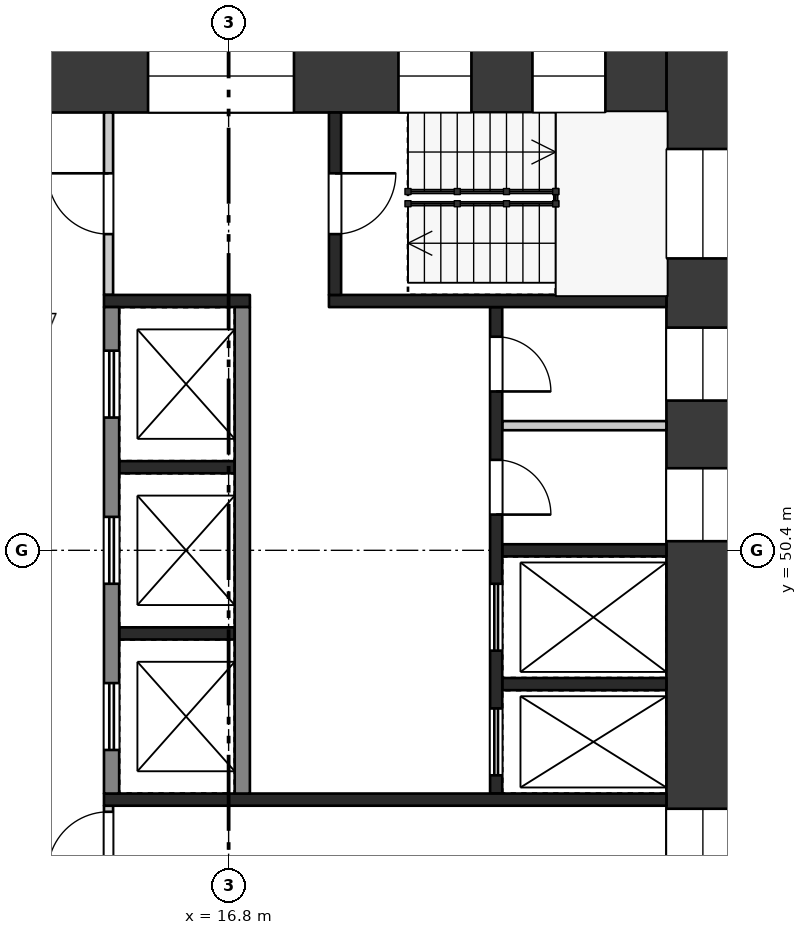
"""IFC4 building model, lengths in metres.
Left out: names, types, materials, properties, quantities, classifications, styles, units other than length and angle.
Written with IfcOpenShell. Run it as: python <this file> out.ifc"""

import sys

from ifc_helpers import new_model, si_unit, direction, frame, frame_2d, origin, place, context, subcontext, project, spatial, rectangle, extrude, element, fill, save


model = new_model("IFC4")
c1 = context("Model", 3, precision=1e-05, world=origin(), true_north=direction((0.0, 1.0)))
c2 = subcontext(c1, "Body", "Model", "MODEL_VIEW")
j1 = project(units=[si_unit("LENGTHUNIT", "METRE"), si_unit("PLANEANGLEUNIT", "RADIAN")], contexts=[c1])
p1 = place(None, origin())
s1 = spatial("IfcSite", under=j1, at=p1, CompositionType="ELEMENT")
p2 = place(p1, origin())
s2 = spatial("IfcBuilding", under=s1, at=p2, CompositionType="ELEMENT")
p3 = place(p2, frame((0.0, 0.0, 224.7)))
s3 = spatial("IfcBuildingStorey", under=s2, at=p3, CompositionType="ELEMENT", Elevation=224.7)
p4 = place(p3, frame((24.6, 58.8, 0.0), z_axis=(0.0, 0.0, 1.0), x_axis=(0.0, -1.0, 0.0)))
e1 = element("IfcWall", 1, at=p4, inside=s3, PredefinedType="SHEAR", context=c2, shape_type="SweptSolid", body=[
    extrude(rectangle(XDim=16.8, YDim=1.2, at=frame_2d((8.4, 0.0))), origin(), (0.0, 0.0, 1.0), 3.22),
])
p5 = place(p4, frame((1.8, 0.0, 0.5)))
e2 = element("IfcOpeningElement", 2, at=p5, cuts=e1, PredefinedType="OPENING", context=c2, shape_type="SweptSolid", body=[
    extrude(rectangle(XDim=1.8, YDim=2.4, at=frame_2d((0.9, 1.2))), frame((0.0, 0.61, 0.0), z_axis=(0.0, -1.0, 0.0), x_axis=(1.0, 0.0, 0.0)), (0.0, 0.0, 1.0), 1.22),
])
p6 = place(p4, frame((4.738, 0.0, 1.6)))
e3 = element("IfcOpeningElement", 3, at=p6, cuts=e1, PredefinedType="OPENING", context=c2, shape_type="SweptSolid", body=[
    extrude(rectangle(XDim=1.2, YDim=1.2, at=frame_2d((0.6, 0.6))), frame((0.0, 0.61, 0.0), z_axis=(0.0, -1.0, 0.0), x_axis=(1.0, 0.0, 0.0)), (0.0, 0.0, 1.0), 1.22),
])
p7 = place(p4, frame((7.05, 0.0, 1.6)))
e4 = element("IfcOpeningElement", 4, at=p7, cuts=e1, PredefinedType="OPENING", context=c2, shape_type="SweptSolid", body=[
    extrude(rectangle(XDim=1.2, YDim=1.2, at=frame_2d((0.6, 0.6))), frame((0.0, 0.61, 0.0), z_axis=(0.0, -1.0, 0.0), x_axis=(1.0, 0.0, 0.0)), (0.0, 0.0, 1.0), 1.22),
])
p8 = place(p4, frame((12.65, 0.0, 0.6)))
e5 = element("IfcOpeningElement", 5, at=p8, cuts=e1, PredefinedType="OPENING", context=c2, shape_type="SweptSolid", body=[
    extrude(rectangle(XDim=1.0, YDim=2.1, at=frame_2d((0.5, 1.05))), frame((0.0, 0.61, 0.0), z_axis=(0.0, -1.0, 0.0), x_axis=(1.0, 0.0, 0.0)), (0.0, 0.0, 1.0), 1.22),
])
p9 = place(p4, frame((14.175, 0.0, 1.6)))
e6 = element("IfcOpeningElement", 6, at=p9, cuts=e1, PredefinedType="OPENING", context=c2, shape_type="SweptSolid", body=[
    extrude(rectangle(XDim=1.2, YDim=1.2, at=frame_2d((0.6, 0.6))), frame((0.0, 0.61, 0.0), z_axis=(0.0, -1.0, 0.0), x_axis=(1.0, 0.0, 0.0)), (0.0, 0.0, 1.0), 1.22),
])
p10 = place(p3, frame((9.6, 58.2, 0.0), z_axis=(0.0, 0.0, 1.0), x_axis=(1.0, 0.0, 0.0)))
e7 = element("IfcWall", 7, at=p10, inside=s3, PredefinedType="SHEAR", context=c2, shape_type="SweptSolid", body=[
    extrude(rectangle(XDim=14.4, YDim=1.2, at=frame_2d((7.2, 0.0))), origin(), (0.0, 0.0, 1.0), 3.22),
])
p11 = place(p10, frame((1.105, 0.0, 0.6)))
e8 = element("IfcOpeningElement", 8, at=p11, cuts=e7, PredefinedType="OPENING", context=c2, shape_type="SweptSolid", body=[
    extrude(rectangle(XDim=3.0, YDim=2.1, at=frame_2d((1.5, 1.05))), frame((0.0, 0.61, 0.0), z_axis=(0.0, -1.0, 0.0), x_axis=(1.0, 0.0, 0.0)), (0.0, 0.0, 1.0), 1.22),
])
p12 = place(p10, frame((5.875, 0.0, 0.6)))
e9 = element("IfcOpeningElement", 9, at=p12, cuts=e7, PredefinedType="OPENING", context=c2, shape_type="SweptSolid", body=[
    extrude(rectangle(XDim=2.4, YDim=2.1, at=frame_2d((1.2, 1.05))), frame((0.0, 0.61, 0.0), z_axis=(0.0, -1.0, 0.0), x_axis=(1.0, 0.0, 0.0)), (0.0, 0.0, 1.0), 1.22),
])
p13 = place(p10, frame((9.993, 0.0, 0.5)))
e10 = element("IfcOpeningElement", 10, at=p13, cuts=e7, PredefinedType="OPENING", context=c2, shape_type="SweptSolid", body=[
    extrude(rectangle(XDim=1.2, YDim=2.4, at=frame_2d((0.6, 1.2))), frame((0.0, 0.61, 0.0), z_axis=(0.0, -1.0, 0.0), x_axis=(1.0, 0.0, 0.0)), (0.0, 0.0, 1.0), 1.22),
])
p14 = place(p10, frame((12.197, 0.0, 0.5)))
e11 = element("IfcOpeningElement", 11, at=p14, cuts=e7, PredefinedType="OPENING", context=c2, shape_type="SweptSolid", body=[
    extrude(rectangle(XDim=1.2, YDim=2.4, at=frame_2d((0.6, 1.2))), frame((0.0, 0.61, 0.0), z_axis=(0.0, -1.0, 0.0), x_axis=(1.0, 0.0, 0.0)), (0.0, 0.0, 1.0), 1.22),
])
for number, where, z_axis, x_axis in (
    (12, (15.0, 51.767, 0.0), (0.0, 0.0, 1.0), (1.0, 0.0, 0.0)),
    (13, (15.0, 49.033, 0.0), (0.0, 0.0, 1.0), (1.0, 0.0, 0.0)),
):
    element("IfcWall", number, at=place(p3, frame(where, z_axis=z_axis, x_axis=x_axis)), inside=s3, PredefinedType="SHEAR", context=c2, shape_type="SweptSolid", body=[
        extrude(rectangle(XDim=1.9, YDim=0.2, at=frame_2d((0.95, 0.0))), origin(), (0.0, 0.0, 1.0), 3.22),
    ])
p15 = place(p3, frame((14.875, 54.4, 0.0), z_axis=(0.0, 0.0, 1.0), x_axis=(0.0, -1.0, 0.0)))
e14 = element("IfcWall", 14, at=p15, inside=s3, PredefinedType="SHEAR", context=c2, shape_type="SweptSolid", body=[
    extrude(rectangle(XDim=8.0, YDim=0.25, at=frame_2d((4.0, 0.0))), origin(), (0.0, 0.0, 1.0), 3.22),
])
p16 = place(p15, frame((0.717, 0.0, 0.0)))
e15 = element("IfcOpeningElement", 15, at=p16, cuts=e14, PredefinedType="OPENING", context=c2, shape_type="SweptSolid", body=[
    extrude(rectangle(XDim=1.1, YDim=2.1, at=frame_2d((0.55, 1.05))), frame((0.0, 0.135, 0.0), z_axis=(0.0, -1.0, 0.0), x_axis=(1.0, 0.0, 0.0)), (0.0, 0.0, 1.0), 0.27),
])
p17 = place(p15, frame((3.45, 0.0, 0.0)))
e16 = element("IfcOpeningElement", 16, at=p17, cuts=e14, PredefinedType="OPENING", context=c2, shape_type="SweptSolid", body=[
    extrude(rectangle(XDim=1.1, YDim=2.1, at=frame_2d((0.55, 1.05))), frame((0.0, 0.135, 0.0), z_axis=(0.0, -1.0, 0.0), x_axis=(1.0, 0.0, 0.0)), (0.0, 0.0, 1.0), 0.27),
])
p18 = place(p15, frame((6.183, 0.0, 0.0)))
e17 = element("IfcOpeningElement", 17, at=p18, cuts=e14, PredefinedType="OPENING", context=c2, shape_type="SweptSolid", body=[
    extrude(rectangle(XDim=1.1, YDim=2.1, at=frame_2d((0.55, 1.05))), frame((0.0, 0.135, 0.0), z_axis=(0.0, -1.0, 0.0), x_axis=(1.0, 0.0, 0.0)), (0.0, 0.0, 1.0), 0.27),
])
p19 = place(p3, frame((17.025, 54.4, 0.0), z_axis=(0.0, 0.0, 1.0), x_axis=(0.0, -1.0, 0.0)))
e18 = element("IfcWall", 18, at=p19, inside=s3, PredefinedType="SHEAR", context=c2, shape_type="SweptSolid", body=[
    extrude(rectangle(XDim=8.0, YDim=0.25, at=frame_2d((4.0, 0.0))), origin(), (0.0, 0.0, 1.0), 3.22),
])
for number, where, z_axis, x_axis in (
    (19, (21.3, 50.4, 0.0), (0.0, 0.0, 1.0), (1.0, 0.0, 0.0)),
    (20, (21.3, 48.2, 0.0), (0.0, 0.0, 1.0), (1.0, 0.0, 0.0)),
):
    element("IfcWall", number, at=place(p3, frame(where, z_axis=z_axis, x_axis=x_axis)), inside=s3, PredefinedType="SHEAR", context=c2, shape_type="SweptSolid", body=[
        extrude(rectangle(XDim=2.7, YDim=0.2, at=frame_2d((1.35, 0.0))), origin(), (0.0, 0.0, 1.0), 3.22),
    ])
p20 = place(p3, frame((21.3, 52.45, 0.0), z_axis=(0.0, 0.0, 1.0), x_axis=(1.0, 0.0, 0.0)))
e21 = element("IfcWall", 21, at=p20, inside=s3, PredefinedType="PARTITIONING", context=c2, shape_type="SweptSolid", body=[
    extrude(rectangle(XDim=2.7, YDim=0.15, at=frame_2d((1.35, 0.0))), origin(), (0.0, 0.0, 1.0), 3.22),
])
p21 = place(p3, frame((21.2, 54.4, 0.0), z_axis=(0.0, 0.0, 1.0), x_axis=(0.0, -1.0, 0.0)))
e22 = element("IfcWall", 22, at=p21, inside=s3, PredefinedType="SHEAR", context=c2, shape_type="SweptSolid", body=[
    extrude(rectangle(XDim=8.0, YDim=0.2, at=frame_2d((4.0, 0.0))), origin(), (0.0, 0.0, 1.0), 3.22),
])
p22 = place(p21, frame((0.488, 0.0, 0.0)))
e23 = element("IfcOpeningElement", 23, at=p22, cuts=e22, PredefinedType="OPENING", context=c2, shape_type="SweptSolid", body=[
    extrude(rectangle(XDim=0.9, YDim=2.1, at=frame_2d((0.45, 1.05))), frame((0.0, 0.11, 0.0), z_axis=(0.0, -1.0, 0.0), x_axis=(1.0, 0.0, 0.0)), (0.0, 0.0, 1.0), 0.22),
])
p23 = place(p21, frame((2.512, 0.0, 0.0)))
e24 = element("IfcOpeningElement", 24, at=p23, cuts=e22, PredefinedType="OPENING", context=c2, shape_type="SweptSolid", body=[
    extrude(rectangle(XDim=0.9, YDim=2.1, at=frame_2d((0.45, 1.05))), frame((0.0, 0.11, 0.0), z_axis=(0.0, -1.0, 0.0), x_axis=(1.0, 0.0, 0.0)), (0.0, 0.0, 1.0), 0.22),
])
p24 = place(p21, frame((4.55, 0.0, 0.0)))
e25 = element("IfcOpeningElement", 25, at=p24, cuts=e22, PredefinedType="OPENING", context=c2, shape_type="SweptSolid", body=[
    extrude(rectangle(XDim=1.1, YDim=2.1, at=frame_2d((0.55, 1.05))), frame((0.0, 0.11, 0.0), z_axis=(0.0, -1.0, 0.0), x_axis=(1.0, 0.0, 0.0)), (0.0, 0.0, 1.0), 0.22),
])
p25 = place(p21, frame((6.6, 0.0, 0.0)))
e26 = element("IfcOpeningElement", 26, at=p25, cuts=e22, PredefinedType="OPENING", context=c2, shape_type="SweptSolid", body=[
    extrude(rectangle(XDim=1.1, YDim=2.1, at=frame_2d((0.55, 1.05))), frame((0.0, 0.11, 0.0), z_axis=(0.0, -1.0, 0.0), x_axis=(1.0, 0.0, 0.0)), (0.0, 0.0, 1.0), 0.22),
])
p26 = place(p3, frame((14.75, 54.5, 0.0), z_axis=(0.0, 0.0, 1.0), x_axis=(1.0, 0.0, 0.0)))
e27 = element("IfcWall", 27, at=p26, inside=s3, PredefinedType="SHEAR", context=c2, shape_type="SweptSolid", body=[
    extrude(rectangle(XDim=2.4, YDim=0.2, at=frame_2d((1.2, 0.0))), origin(), (0.0, 0.0, 1.0), 3.22),
])
p27 = place(p3, frame((18.45, 54.5, 0.0), z_axis=(0.0, 0.0, 1.0), x_axis=(1.0, 0.0, 0.0)))
e28 = element("IfcWall", 28, at=p27, inside=s3, PredefinedType="SHEAR", context=c2, shape_type="SweptSolid", body=[
    extrude(rectangle(XDim=5.55, YDim=0.2, at=frame_2d((2.775, 0.0))), origin(), (0.0, 0.0, 1.0), 3.22),
])
p28 = place(p3, frame((14.825, 57.6, 0.0), z_axis=(0.0, 0.0, 1.0), x_axis=(0.0, -1.0, 0.0)))
e29 = element("IfcWall", 29, at=p28, inside=s3, PredefinedType="PARTITIONING", context=c2, shape_type="SweptSolid", body=[
    extrude(rectangle(XDim=3.0, YDim=0.15, at=frame_2d((1.5, 0.0))), origin(), (0.0, 0.0, 1.0), 3.22),
])
p29 = place(p28, frame((1.0, 0.0, 0.0)))
e30 = element("IfcOpeningElement", 30, at=p29, cuts=e29, PredefinedType="OPENING", context=c2, shape_type="SweptSolid", body=[
    extrude(rectangle(XDim=1.0, YDim=2.1, at=frame_2d((0.5, 1.05))), frame((0.0, 0.085, 0.0), z_axis=(0.0, -1.0, 0.0), x_axis=(1.0, 0.0, 0.0)), (0.0, 0.0, 1.0), 0.17),
])
p30 = place(p3, frame((18.55, 57.6, 0.0), z_axis=(0.0, 0.0, 1.0), x_axis=(0.0, -1.0, 0.0)))
e31 = element("IfcWall", 31, at=p30, inside=s3, PredefinedType="SHEAR", context=c2, shape_type="SweptSolid", body=[
    extrude(rectangle(XDim=3.0, YDim=0.2, at=frame_2d((1.5, 0.0))), origin(), (0.0, 0.0, 1.0), 3.22),
])
p31 = place(p30, frame((1.0, 0.0, 0.0)))
e32 = element("IfcOpeningElement", 32, at=p31, cuts=e31, PredefinedType="OPENING", context=c2, shape_type="SweptSolid", body=[
    extrude(rectangle(XDim=1.0, YDim=2.1, at=frame_2d((0.5, 1.05))), frame((0.0, 0.11, 0.0), z_axis=(0.0, -1.0, 0.0), x_axis=(1.0, 0.0, 0.0)), (0.0, 0.0, 1.0), 0.22),
])
p32 = place(p3, frame((14.75, 46.3, 0.0), z_axis=(0.0, 0.0, 1.0), x_axis=(1.0, 0.0, 0.0)))
e33 = element("IfcWall", 33, at=p32, inside=s3, PredefinedType="SHEAR", context=c2, shape_type="SweptSolid", body=[
    extrude(rectangle(XDim=9.25, YDim=0.2, at=frame_2d((4.625, 0.0))), origin(), (0.0, 0.0, 1.0), 3.22),
])
p33 = place(p3, frame((14.825, 46.2, 0.0), z_axis=(0.0, 0.0, 1.0), x_axis=(0.0, -1.0, 0.0)))
e34 = element("IfcWall", 34, at=p33, inside=s3, PredefinedType="PARTITIONING", context=c2, shape_type="SweptSolid", body=[
    extrude(rectangle(XDim=3.0, YDim=0.15, at=frame_2d((1.5, 0.0))), origin(), (0.0, 0.0, 1.0), 3.22),
])
p34 = place(p33, frame((0.1, 0.0, 0.0)))
e35 = element("IfcOpeningElement", 35, at=p34, cuts=e34, PredefinedType="OPENING", context=c2, shape_type="SweptSolid", body=[
    extrude(rectangle(XDim=1.0, YDim=2.1, at=frame_2d((0.5, 1.05))), frame((0.0, 0.085, 0.0), z_axis=(0.0, -1.0, 0.0), x_axis=(1.0, 0.0, 0.0)), (0.0, 0.0, 1.0), 0.17),
])
p35 = place(p16, origin())
e36 = element("IfcDoor", 36, at=p35, inside=s3, OperationType="DOUBLE_DOOR_SLIDING", PredefinedType="DOOR", context=c2, shape_type="SweptSolid", body=[
    extrude(rectangle(XDim=1.1, YDim=2.1, at=frame_2d((0.55, 1.05))), frame((0.0, 0.025, 0.0), z_axis=(0.0, -1.0, 0.0), x_axis=(1.0, 0.0, 0.0)), (0.0, 0.0, 1.0), 0.05),
])
fill(e15, e36)
p36 = place(p17, origin())
e37 = element("IfcDoor", 37, at=p36, inside=s3, OperationType="DOUBLE_DOOR_SLIDING", PredefinedType="DOOR", context=c2, shape_type="SweptSolid", body=[
    extrude(rectangle(XDim=1.1, YDim=2.1, at=frame_2d((0.55, 1.05))), frame((0.0, 0.025, 0.0), z_axis=(0.0, -1.0, 0.0), x_axis=(1.0, 0.0, 0.0)), (0.0, 0.0, 1.0), 0.05),
])
fill(e16, e37)
p37 = place(p18, origin())
e38 = element("IfcDoor", 38, at=p37, inside=s3, OperationType="DOUBLE_DOOR_SLIDING", PredefinedType="DOOR", context=c2, shape_type="SweptSolid", body=[
    extrude(rectangle(XDim=1.1, YDim=2.1, at=frame_2d((0.55, 1.05))), frame((0.0, 0.025, 0.0), z_axis=(0.0, -1.0, 0.0), x_axis=(1.0, 0.0, 0.0)), (0.0, 0.0, 1.0), 0.05),
])
fill(e17, e38)
p38 = place(p22, origin())
e39 = element("IfcDoor", 39, at=p38, inside=s3, OperationType="SINGLE_SWING_RIGHT", PredefinedType="DOOR", context=c2, shape_type="SweptSolid", body=[
    extrude(rectangle(XDim=0.9, YDim=2.1, at=frame_2d((0.45, 1.05))), frame((0.0, 0.025, 0.0), z_axis=(0.0, -1.0, 0.0), x_axis=(1.0, 0.0, 0.0)), (0.0, 0.0, 1.0), 0.05),
])
fill(e23, e39)
p39 = place(p23, origin())
e40 = element("IfcDoor", 40, at=p39, inside=s3, OperationType="SINGLE_SWING_RIGHT", PredefinedType="DOOR", context=c2, shape_type="SweptSolid", body=[
    extrude(rectangle(XDim=0.9, YDim=2.1, at=frame_2d((0.45, 1.05))), frame((0.0, 0.025, 0.0), z_axis=(0.0, -1.0, 0.0), x_axis=(1.0, 0.0, 0.0)), (0.0, 0.0, 1.0), 0.05),
])
fill(e24, e40)
p40 = place(p24, origin())
e41 = element("IfcDoor", 41, at=p40, inside=s3, OperationType="DOUBLE_DOOR_SLIDING", PredefinedType="DOOR", context=c2, shape_type="SweptSolid", body=[
    extrude(rectangle(XDim=1.1, YDim=2.1, at=frame_2d((0.55, 1.05))), frame((0.0, 0.025, 0.0), z_axis=(0.0, -1.0, 0.0), x_axis=(1.0, 0.0, 0.0)), (0.0, 0.0, 1.0), 0.05),
])
fill(e25, e41)
p41 = place(p25, origin())
e42 = element("IfcDoor", 42, at=p41, inside=s3, OperationType="DOUBLE_DOOR_SLIDING", PredefinedType="DOOR", context=c2, shape_type="SweptSolid", body=[
    extrude(rectangle(XDim=1.1, YDim=2.1, at=frame_2d((0.55, 1.05))), frame((0.0, 0.025, 0.0), z_axis=(0.0, -1.0, 0.0), x_axis=(1.0, 0.0, 0.0)), (0.0, 0.0, 1.0), 0.05),
])
fill(e26, e42)
p42 = place(p29, frame((1.0, 0.0, 0.0), z_axis=(0.0, 0.0, 1.0), x_axis=(-1.0, 0.0, 0.0)))
e43 = element("IfcDoor", 43, at=p42, inside=s3, OperationType="SINGLE_SWING_RIGHT", PredefinedType="DOOR", context=c2, shape_type="SweptSolid", body=[
    extrude(rectangle(XDim=1.0, YDim=2.1, at=frame_2d((0.5, 1.05))), frame((0.0, 0.025, 0.0), z_axis=(0.0, -1.0, 0.0), x_axis=(1.0, 0.0, 0.0)), (0.0, 0.0, 1.0), 0.05),
])
fill(e30, e43)
p43 = place(p31, origin())
e44 = element("IfcDoor", 44, at=p43, inside=s3, OperationType="SINGLE_SWING_LEFT", PredefinedType="DOOR", context=c2, shape_type="SweptSolid", body=[
    extrude(rectangle(XDim=1.0, YDim=2.1, at=frame_2d((0.5, 1.05))), frame((0.0, 0.025, 0.0), z_axis=(0.0, -1.0, 0.0), x_axis=(1.0, 0.0, 0.0)), (0.0, 0.0, 1.0), 0.05),
])
fill(e32, e44)
p44 = place(p34, frame((1.0, 0.0, 0.0), z_axis=(0.0, 0.0, 1.0), x_axis=(-1.0, 0.0, 0.0)))
e45 = element("IfcDoor", 45, at=p44, inside=s3, OperationType="SINGLE_SWING_LEFT", PredefinedType="DOOR", context=c2, shape_type="SweptSolid", body=[
    extrude(rectangle(XDim=1.0, YDim=2.1, at=frame_2d((0.5, 1.05))), frame((0.0, 0.025, 0.0), z_axis=(0.0, -1.0, 0.0), x_axis=(1.0, 0.0, 0.0)), (0.0, 0.0, 1.0), 0.05),
])
fill(e35, e45)
p45 = place(p5, origin())
e46 = element("IfcWindow", 46, at=p45, inside=s3, PartitioningType="SINGLE_PANEL", PredefinedType="WINDOW", context=c2, shape_type="SweptSolid", body=[
    extrude(rectangle(XDim=1.8, YDim=2.4, at=frame_2d((0.9, 1.2))), frame((0.0, 0.03, 0.0), z_axis=(0.0, -1.0, 0.0), x_axis=(1.0, 0.0, 0.0)), (0.0, 0.0, 1.0), 0.06),
])
fill(e2, e46)
p46 = place(p6, origin())
e47 = element("IfcWindow", 47, at=p46, inside=s3, PartitioningType="SINGLE_PANEL", PredefinedType="WINDOW", context=c2, shape_type="SweptSolid", body=[
    extrude(rectangle(XDim=1.2, YDim=1.2, at=frame_2d((0.6, 0.6))), frame((0.0, 0.03, 0.0), z_axis=(0.0, -1.0, 0.0), x_axis=(1.0, 0.0, 0.0)), (0.0, 0.0, 1.0), 0.06),
])
fill(e3, e47)
p47 = place(p7, origin())
e48 = element("IfcWindow", 48, at=p47, inside=s3, PartitioningType="SINGLE_PANEL", PredefinedType="WINDOW", context=c2, shape_type="SweptSolid", body=[
    extrude(rectangle(XDim=1.2, YDim=1.2, at=frame_2d((0.6, 0.6))), frame((0.0, 0.03, 0.0), z_axis=(0.0, -1.0, 0.0), x_axis=(1.0, 0.0, 0.0)), (0.0, 0.0, 1.0), 0.06),
])
fill(e4, e48)
p48 = place(p8, origin())
e49 = element("IfcWindow", 49, at=p48, inside=s3, PartitioningType="SINGLE_PANEL", PredefinedType="WINDOW", context=c2, shape_type="SweptSolid", body=[
    extrude(rectangle(XDim=1.0, YDim=2.1, at=frame_2d((0.5, 1.05))), frame((0.0, 0.03, 0.0), z_axis=(0.0, -1.0, 0.0), x_axis=(1.0, 0.0, 0.0)), (0.0, 0.0, 1.0), 0.06),
])
fill(e5, e49)
p49 = place(p12, origin())
e50 = element("IfcWindow", 50, at=p49, inside=s3, PartitioningType="SINGLE_PANEL", PredefinedType="WINDOW", context=c2, shape_type="SweptSolid", body=[
    extrude(rectangle(XDim=2.4, YDim=2.1, at=frame_2d((1.2, 1.05))), frame((0.0, 0.03, 0.0), z_axis=(0.0, -1.0, 0.0), x_axis=(1.0, 0.0, 0.0)), (0.0, 0.0, 1.0), 0.06),
])
fill(e9, e50)
p50 = place(p13, origin())
e51 = element("IfcWindow", 51, at=p50, inside=s3, PartitioningType="SINGLE_PANEL", PredefinedType="WINDOW", context=c2, shape_type="SweptSolid", body=[
    extrude(rectangle(XDim=1.2, YDim=2.4, at=frame_2d((0.6, 1.2))), frame((0.0, 0.03, 0.0), z_axis=(0.0, -1.0, 0.0), x_axis=(1.0, 0.0, 0.0)), (0.0, 0.0, 1.0), 0.06),
])
fill(e10, e51)
p51 = place(p14, origin())
e52 = element("IfcWindow", 52, at=p51, inside=s3, PartitioningType="SINGLE_PANEL", PredefinedType="WINDOW", context=c2, shape_type="SweptSolid", body=[
    extrude(rectangle(XDim=1.2, YDim=2.4, at=frame_2d((0.6, 1.2))), frame((0.0, 0.03, 0.0), z_axis=(0.0, -1.0, 0.0), x_axis=(1.0, 0.0, 0.0)), (0.0, 0.0, 1.0), 0.06),
])
fill(e11, e52)
save(model, sys.argv[1])
